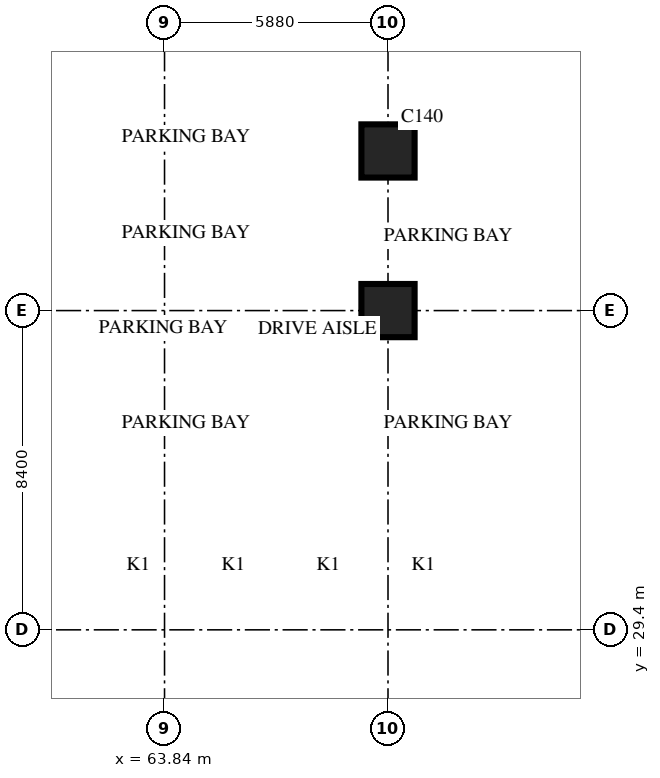
"""IFC4 building model, lengths in metres.
Left out: names, types, materials, properties, quantities, classifications, styles, units other than length and angle.
Written with IfcOpenShell. Run it as: python <this file> out.ifc"""

import sys

from ifc_helpers import new_model, si_unit, direction, frame, origin, origin_2d, place, context, subcontext, project, spatial, rectangle, extrude, source, transform, mapped, element, save


model = new_model("IFC4")
c1 = context("Model", 3, precision=1e-05, world=origin(), true_north=direction((0.0, 1.0)))
c2 = subcontext(c1, "Body", "Model", "MODEL_VIEW")
j1 = project(units=[si_unit("LENGTHUNIT", "METRE"), si_unit("PLANEANGLEUNIT", "RADIAN")], contexts=[c1])
p1 = place(None, origin())
s1 = spatial("IfcSite", under=j1, at=p1, CompositionType="ELEMENT")
p2 = place(p1, origin())
s2 = spatial("IfcBuilding", under=s1, at=p2, CompositionType="ELEMENT")
p3 = place(p2, frame((0.0, 0.0, -9.0)))
s3 = spatial("IfcBuildingStorey", under=s2, at=p3, CompositionType="ELEMENT", Elevation=-9.0)
m1 = source(origin(), c2, "Body", "SweptSolid", [
    extrude(rectangle(XDim=1.4, YDim=1.4, at=origin_2d()), origin(), (0.0, 0.0, 1.0), 4.5),
])
for number, where, z_axis, x_axis in (
    (1, (69.72, 37.8, 0.0), (0.0, 0.0, 1.0), (1.0, 0.0, 0.0)),
    (2, (69.72, 42.0, 0.0), (0.0, 0.0, 1.0), (1.0, 0.0, 0.0)),
):
    element("IfcColumn", number, at=place(p3, frame(where, z_axis=z_axis, x_axis=x_axis)), inside=s3, PredefinedType="COLUMN", context=c2, shape_type="MappedRepresentation", body=[
        mapped(m1, transform((0.0, 0.0, 0.0), scale=1.0)),
    ])
save(model, sys.argv[1])
